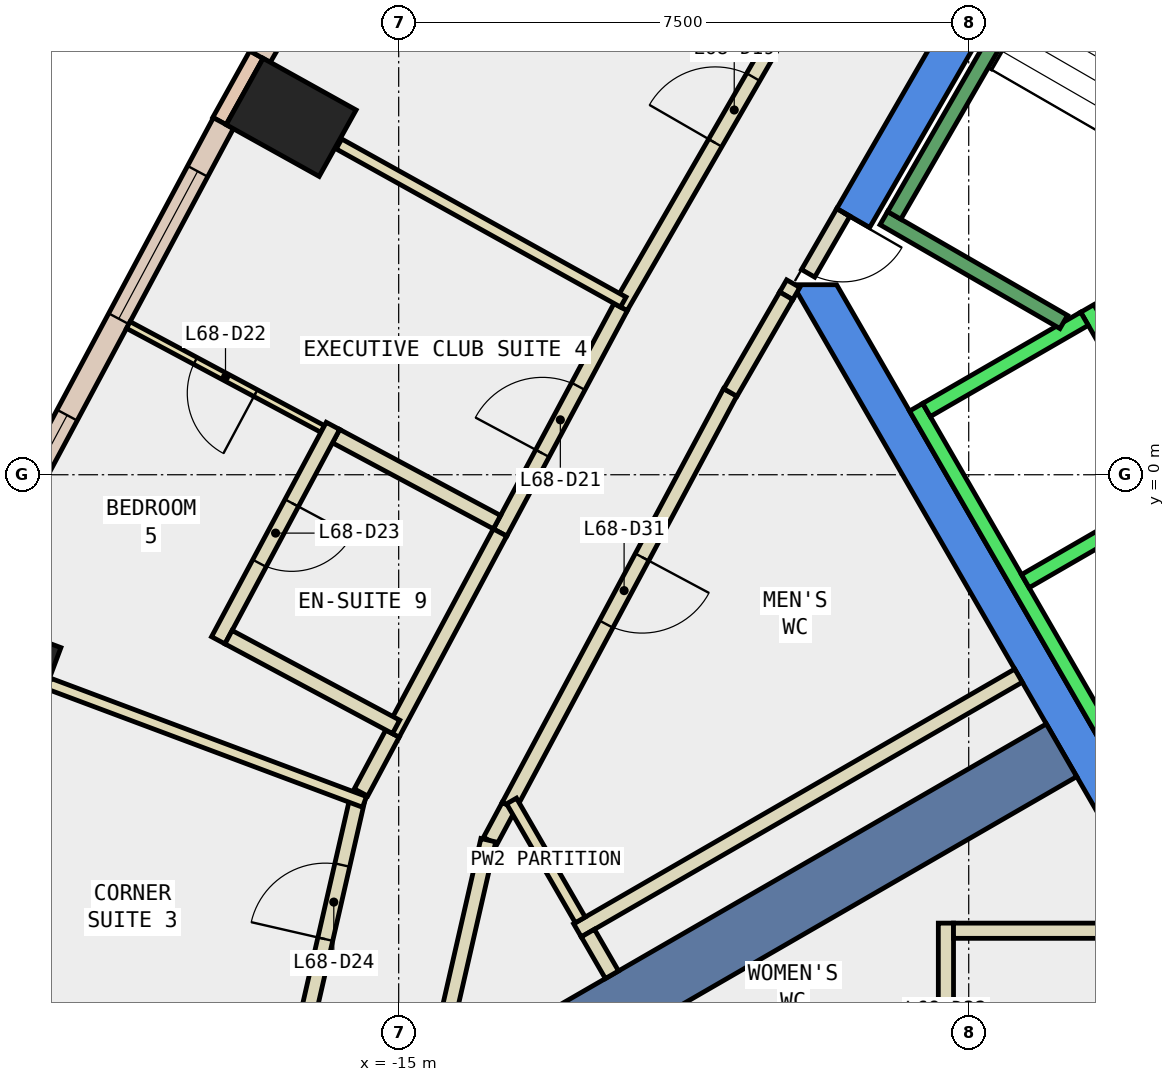
"""IFC4 building model, lengths in metres.
Left out: names, types, materials, properties, quantities, classifications, styles, units other than length and angle.
Written with IfcOpenShell. Run it as: python <this file> out.ifc"""

import sys

from ifc_helpers import new_model, si_unit, direction, frame, frame_2d, origin, origin_2d, place, context, subcontext, project, spatial, polyline, rectangle, outline, extrude, element, fill, save


model = new_model("IFC4")
c1 = context("Model", 3, precision=1e-05, world=origin(), true_north=direction((0.0, 1.0)))
c2 = subcontext(c1, "Body", "Model", "MODEL_VIEW")
j1 = project(units=[si_unit("LENGTHUNIT", "METRE"), si_unit("PLANEANGLEUNIT", "RADIAN")], contexts=[c1])
p1 = place(None, origin())
s1 = spatial("IfcSite", under=j1, at=p1, CompositionType="ELEMENT")
p2 = place(p1, origin())
s2 = spatial("IfcBuilding", under=s1, at=p2, CompositionType="ELEMENT")
p3 = place(p2, frame((0.0, 0.0, 293.6)))
s3 = spatial("IfcBuildingStorey", under=s2, at=p3, CompositionType="ELEMENT", Elevation=293.6)
for number, where, z_axis, x_axis in (
    (1, (-16.415, 4.702, -0.34), (0.0, 0.0, 1.0), (0.486, 0.874, 0.0)),
    (2, (-20.275, -2.497, -0.34), (0.0, 0.0, 1.0), (0.351, 0.936, 0.0)),
):
    element("IfcColumn", number, at=place(p3, frame(where, z_axis=z_axis, x_axis=x_axis)), inside=s3, PredefinedType="COLUMN", context=c2, shape_type="SweptSolid", body=[
        extrude(rectangle(XDim=1.0, YDim=1.4, at=origin_2d()), origin(), (0.0, 0.0, 1.0), 3.6),
    ])
p4 = place(p3, frame((0.0, 0.0, -0.34)))
e3 = element("IfcWall", 3, at=p4, inside=s3, PredefinedType="SHEAR", context=c2, shape_type="SweptSolid", body=[
    extrude(outline(polyline([(-9.236, 3.502), (-8.803, 3.253), (-4.619, 10.5), (-4.907, 11.0), (-9.236, 3.502)])), origin(), (0.0, 0.0, 1.0), 3.6),
])
p5 = place(p3, frame((0.0, 0.0, -0.34)))
e4 = element("IfcWall", 4, at=p5, inside=s3, PredefinedType="SHEAR", context=c2, shape_type="SweptSolid", body=[
    extrude(outline(polyline([(-9.815, 2.5), (-4.907, -6.0), (-4.619, -5.5), (-9.238, 2.5), (-9.815, 2.5)])), origin(), (0.0, 0.0, 1.0), 3.6),
])
p6 = place(p3, frame((-6.279, -3.625, -0.34), z_axis=(0.0, 0.0, 1.0), x_axis=(-0.866017533419, -0.500013631625, 0.0)))
e5 = element("IfcWall", 5, at=p6, inside=s3, PredefinedType="SHEAR", context=c2, shape_type="SweptSolid", body=[
    extrude(rectangle(XDim=9.0, YDim=0.8, at=frame_2d((4.5, 0.0))), origin(), (0.0, 0.0, 1.0), 3.6),
])
p7 = place(p3, frame((-16.872, 5.527, 0.0), z_axis=(0.0, 0.0, 1.0), x_axis=(-0.485850211157, -0.874042088414, 0.0)))
e6 = element("IfcWall", 6, at=p7, inside=s3, PredefinedType="STANDARD", context=c2, shape_type="SweptSolid", body=[
    extrude(rectangle(XDim=1.0, YDim=0.2, at=frame_2d((0.5, 0.0))), origin(), (0.0, 0.0, 1.0), 3.26),
])
p8 = place(p3, frame((-13.172, 11.819, 0.0), z_axis=(0.0, 0.0, 1.0), x_axis=(-0.499945412946, -0.866056917341, 0.0)))
e7 = element("IfcWall", 7, at=p8, inside=s3, PredefinedType="STANDARD", context=c2, shape_type="SweptSolid", body=[
    extrude(rectangle(XDim=7.299, YDim=0.3, at=frame_2d((3.649, 0.0))), origin(), (0.0, 0.0, 1.0), 3.26),
])
p9 = place(p8, frame((0.725, 0.0, 0.9)))
e8 = element("IfcOpeningElement", 8, at=p9, cuts=e7, PredefinedType="OPENING", context=c2, shape_type="SweptSolid", body=[
    extrude(rectangle(XDim=2.2, YDim=2.0, at=frame_2d((1.1, 1.0))), frame((0.0, 0.16, 0.0), z_axis=(0.0, -1.0, 0.0), x_axis=(1.0, 0.0, 0.0)), (0.0, 0.0, 1.0), 0.32),
])
p10 = place(p8, frame((4.374, 0.0, 0.9)))
e9 = element("IfcOpeningElement", 9, at=p10, cuts=e7, PredefinedType="OPENING", context=c2, shape_type="SweptSolid", body=[
    extrude(rectangle(XDim=2.2, YDim=2.0, at=frame_2d((1.1, 1.0))), frame((0.0, 0.16, 0.0), z_axis=(0.0, -1.0, 0.0), x_axis=(1.0, 0.0, 0.0)), (0.0, 0.0, 1.0), 0.32),
])
p11 = place(p3, frame((-17.306, 4.626, 0.0), z_axis=(0.0, 0.0, 1.0), x_axis=(-0.471789353675, -0.881711293882, 0.0)))
e10 = element("IfcWall", 10, at=p11, inside=s3, PredefinedType="STANDARD", context=c2, shape_type="SweptSolid", body=[
    extrude(rectangle(XDim=7.277, YDim=0.3, at=frame_2d((3.638, 0.0))), origin(), (0.0, 0.0, 1.0), 3.26),
])
p12 = place(p11, frame((0.719, 0.0, 0.9)))
e11 = element("IfcOpeningElement", 11, at=p12, cuts=e10, PredefinedType="OPENING", context=c2, shape_type="SweptSolid", body=[
    extrude(rectangle(XDim=2.2, YDim=2.0, at=frame_2d((1.1, 1.0))), frame((0.0, 0.16, 0.0), z_axis=(0.0, -1.0, 0.0), x_axis=(1.0, 0.0, 0.0)), (0.0, 0.0, 1.0), 0.32),
])
p13 = place(p11, frame((4.358, 0.0, 0.9)))
e12 = element("IfcOpeningElement", 12, at=p13, cuts=e10, PredefinedType="OPENING", context=c2, shape_type="SweptSolid", body=[
    extrude(rectangle(XDim=2.2, YDim=2.0, at=frame_2d((1.1, 1.0))), frame((0.0, 0.16, 0.0), z_axis=(0.0, -1.0, 0.0), x_axis=(1.0, 0.0, 0.0)), (0.0, 0.0, 1.0), 0.32),
])
p14 = place(p3, frame((-9.809, 2.514, 0.0), z_axis=(0.0, 0.0, 1.0), x_axis=(-0.497849076449, -0.867263683708, 0.0)))
e13 = element("IfcWall", 13, at=p14, inside=s3, PredefinedType="PARTITIONING", context=c2, shape_type="SweptSolid", body=[
    extrude(rectangle(XDim=0.184, YDim=0.2, at=frame_2d((0.092, 0.0))), origin(), (0.0, 0.0, 1.0), 2.4),
])
p15 = place(p3, frame((-10.639, 1.084, 0.0), z_axis=(0.0, 0.0, 1.0), x_axis=(-0.471696599276, -0.881760918975, 0.0)))
e14 = element("IfcWall", 14, at=p15, inside=s3, PredefinedType="PARTITIONING", context=c2, shape_type="SweptSolid", body=[
    extrude(rectangle(XDim=6.172, YDim=0.2, at=frame_2d((3.086, 0.0))), origin(), (0.0, 0.0, 1.0), 3.26),
])
p16 = place(p15, frame((2.458, 0.0, 0.0)))
e15 = element("IfcOpeningElement", 15, at=p16, cuts=e14, PredefinedType="OPENING", context=c2, shape_type="SweptSolid", body=[
    extrude(rectangle(XDim=1.0, YDim=2.1, at=frame_2d((0.5, 1.05))), frame((0.0, 0.11, 0.0), z_axis=(0.0, -1.0, 0.0), x_axis=(1.0, 0.0, 0.0)), (0.0, 0.0, 1.0), 0.22),
])
p17 = place(p3, frame((-13.55, -4.358, 0.0), z_axis=(0.0, 0.0, 1.0), x_axis=(-0.472169364753, -0.881507850781, 0.0)))
e16 = element("IfcWall", 16, at=p17, inside=s3, PredefinedType="PARTITIONING", context=c2, shape_type="SweptSolid", body=[
    extrude(rectangle(XDim=0.521, YDim=0.2, at=frame_2d((0.26, 0.0))), origin(), (0.0, 0.0, 1.0), 3.26),
])
p18 = place(p3, frame((-13.821, -4.808, 0.0), z_axis=(0.0, 0.0, 1.0), x_axis=(-0.223248099856, -0.97476165595, 0.0)))
e17 = element("IfcWall", 17, at=p18, inside=s3, PredefinedType="PARTITIONING", context=c2, shape_type="SweptSolid", body=[
    extrude(rectangle(XDim=2.302, YDim=0.2, at=frame_2d((1.151, 0.0))), origin(), (0.0, 0.0, 1.0), 3.26),
])
p19 = place(p3, frame((-12.082, 2.207, 0.0), z_axis=(0.0, 0.0, 1.0), x_axis=(0.500123454404, 0.865954115618, 0.0)))
e18 = element("IfcWall", 18, at=p19, inside=s3, PredefinedType="PARTITIONING", context=c2, shape_type="SweptSolid", body=[
    extrude(rectangle(XDim=5.885, YDim=0.2, at=frame_2d((2.942, 0.0))), origin(), (0.0, 0.0, 1.0), 3.26),
])
p20 = place(p19, frame((2.493, 0.0, 0.0)))
e19 = element("IfcOpeningElement", 19, at=p20, cuts=e18, PredefinedType="OPENING", context=c2, shape_type="SweptSolid", body=[
    extrude(rectangle(XDim=1.0, YDim=2.1, at=frame_2d((0.5, 1.05))), frame((0.0, 0.11, 0.0), z_axis=(0.0, -1.0, 0.0), x_axis=(1.0, 0.0, 0.0)), (0.0, 0.0, 1.0), 0.22),
])
p21 = place(p3, frame((-13.666, -0.76, 0.0), z_axis=(0.0, 0.0, 1.0), x_axis=(0.471643060173, 0.881789557543, 0.0)))
e20 = element("IfcWall", 20, at=p21, inside=s3, PredefinedType="PARTITIONING", context=c2, shape_type="SweptSolid", body=[
    extrude(rectangle(XDim=3.363, YDim=0.2, at=frame_2d((1.681, 0.0))), origin(), (0.0, 0.0, 1.0), 3.26),
])
p22 = place(p21, frame((1.181, 0.0, 0.0)))
e21 = element("IfcOpeningElement", 21, at=p22, cuts=e20, PredefinedType="OPENING", context=c2, shape_type="SweptSolid", body=[
    extrude(rectangle(XDim=1.0, YDim=2.1, at=frame_2d((0.5, 1.05))), frame((0.0, 0.11, 0.0), z_axis=(0.0, -1.0, 0.0), x_axis=(1.0, 0.0, 0.0)), (0.0, 0.0, 1.0), 0.22),
])
p23 = place(p3, frame((-15.496, -4.18, 0.0), z_axis=(0.0, 0.0, 1.0), x_axis=(0.471280380621, 0.881983448167, 0.0)))
e22 = element("IfcWall", 22, at=p23, inside=s3, PredefinedType="PARTITIONING", context=c2, shape_type="SweptSolid", body=[
    extrude(rectangle(XDim=0.879, YDim=0.2, at=frame_2d((0.439, 0.0))), origin(), (0.0, 0.0, 1.0), 3.26),
])
p24 = place(p3, frame((-15.082, -3.405, 0.0), z_axis=(0.0, 0.0, 1.0), x_axis=(0.471719946084, 0.88174842924, 0.0)))
e23 = element("IfcWall", 23, at=p24, inside=s3, PredefinedType="PARTITIONING", context=c2, shape_type="SweptSolid", body=[
    extrude(rectangle(XDim=3.0, YDim=0.2, at=frame_2d((1.5, 0.0))), origin(), (0.0, 0.0, 1.0), 3.26),
])
p25 = place(p3, frame((-16.192, -7.098, 0.0), z_axis=(0.0, 0.0, 1.0), x_axis=(0.22330023395, 0.974749714295, 0.0)))
e24 = element("IfcWall", 24, at=p25, inside=s3, PredefinedType="PARTITIONING", context=c2, shape_type="SweptSolid", body=[
    extrude(rectangle(XDim=2.928, YDim=0.2, at=frame_2d((1.464, 0.0))), origin(), (0.0, 0.0, 1.0), 3.26),
])
p26 = place(p25, frame((1.014, 0.0, 0.0)))
e25 = element("IfcOpeningElement", 25, at=p26, cuts=e24, PredefinedType="OPENING", context=c2, shape_type="SweptSolid", body=[
    extrude(rectangle(XDim=1.0, YDim=2.1, at=frame_2d((0.5, 1.05))), frame((0.0, 0.11, 0.0), z_axis=(0.0, -1.0, 0.0), x_axis=(1.0, 0.0, 0.0)), (0.0, 0.0, 1.0), 0.22),
])
p27 = place(p3, frame((-7.8, -9.775, 0.0), z_axis=(0.0, 0.0, 1.0), x_axis=(0.0, 1.0, 0.0)))
e26 = element("IfcWall", 26, at=p27, inside=s3, PredefinedType="PARTITIONING", context=c2, shape_type="SweptSolid", body=[
    extrude(rectangle(XDim=3.876, YDim=0.2, at=frame_2d((1.938, 0.0))), origin(), (0.0, 0.0, 1.0), 3.26),
])
p28 = place(p27, frame((1.438, 0.0, 0.0)))
e27 = element("IfcOpeningElement", 27, at=p28, cuts=e26, PredefinedType="OPENING", context=c2, shape_type="SweptSolid", body=[
    extrude(rectangle(XDim=1.0, YDim=2.1, at=frame_2d((0.5, 1.05))), frame((0.0, 0.11, 0.0), z_axis=(0.0, -1.0, 0.0), x_axis=(1.0, 0.0, 0.0)), (0.0, 0.0, 1.0), 0.22),
])
p29 = place(p3, frame((-7.7, -5.999, 0.0), z_axis=(0.0, 0.0, 1.0), x_axis=(1.0, 0.0, 0.0)))
e28 = element("IfcWall", 28, at=p29, inside=s3, PredefinedType="PARTITIONING", context=c2, shape_type="SweptSolid", body=[
    extrude(rectangle(XDim=2.792, YDim=0.2, at=frame_2d((1.396, 0.0))), origin(), (0.0, 0.0, 1.0), 3.26),
])
p30 = place(p3, frame((-6.845, -2.643, 0.0), z_axis=(0.0, 0.0, 1.0), x_axis=(-0.865994457699, -0.500053596362, 0.0)))
e29 = element("IfcWall", 29, at=p30, inside=s3, PredefinedType="PARTITIONING", context=c2, shape_type="SweptSolid", body=[
    extrude(rectangle(XDim=6.701, YDim=0.2, at=frame_2d((3.351, 0.0))), origin(), (0.0, 0.0, 1.0), 3.26),
])
p31 = place(p3, frame((-12.611, -5.857, 0.0), z_axis=(0.0, 0.0, 1.0), x_axis=(-0.500120037633, 0.865956088932, 0.0)))
e30 = element("IfcWall", 30, at=p31, inside=s3, PredefinedType="PARTITIONING", context=c2, shape_type="SweptSolid", body=[
    extrude(rectangle(XDim=1.807, YDim=0.15, at=frame_2d((0.904, 0.0))), origin(), (0.0, 0.0, 1.0), 3.26),
])
p32 = place(p3, frame((-12.045, 2.272, 0.0), z_axis=(0.0, 0.0, 1.0), x_axis=(-0.873982340973, 0.485957680943, 0.0)))
e31 = element("IfcWall", 31, at=p32, inside=s3, PredefinedType="PARTITIONING", context=c2, shape_type="SweptSolid", body=[
    extrude(rectangle(XDim=4.28, YDim=0.15, at=frame_2d((2.14, 0.0))), origin(), (0.0, 0.0, 1.0), 3.26),
])
p33 = place(p3, frame((-16.0, 0.602, 0.0), z_axis=(0.0, 0.0, 1.0), x_axis=(-0.881743923375, 0.47172836844, 0.0)))
e32 = element("IfcWall", 32, at=p33, inside=s3, PredefinedType="PARTITIONING", context=c2, shape_type="SweptSolid", body=[
    extrude(rectangle(XDim=2.9, YDim=0.1, at=frame_2d((1.45, 0.0))), origin(), (0.0, 0.0, 1.0), 3.26),
])
p34 = place(p33, frame((1.0, 0.0, 0.0)))
e33 = element("IfcOpeningElement", 33, at=p34, cuts=e32, PredefinedType="OPENING", context=c2, shape_type="SweptSolid", body=[
    extrude(rectangle(XDim=0.9, YDim=2.1, at=frame_2d((0.45, 1.05))), frame((0.0, 0.06, 0.0), z_axis=(0.0, -1.0, 0.0), x_axis=(1.0, 0.0, 0.0)), (0.0, 0.0, 1.0), 0.12),
])
p35 = place(p3, frame((-13.707, -0.624, 0.0), z_axis=(0.0, 0.0, 1.0), x_axis=(-0.881825950813, 0.471575012562, 0.0)))
e34 = element("IfcWall", 34, at=p35, inside=s3, PredefinedType="PARTITIONING", context=c2, shape_type="SweptSolid", body=[
    extrude(rectangle(XDim=2.401, YDim=0.2, at=frame_2d((1.2, 0.0))), origin(), (0.0, 0.0, 1.0), 3.26),
])
p36 = place(p3, frame((-15.865, 0.643, 0.0), z_axis=(0.0, 0.0, 1.0), x_axis=(-0.471677088066, -0.881771356188, 0.0)))
e35 = element("IfcWall", 35, at=p36, inside=s3, PredefinedType="PARTITIONING", context=c2, shape_type="SweptSolid", body=[
    extrude(rectangle(XDim=3.199, YDim=0.2, at=frame_2d((1.6, 0.0))), origin(), (0.0, 0.0, 1.0), 3.26),
])
p37 = place(p36, frame((1.15, 0.0, 0.0)))
e36 = element("IfcOpeningElement", 36, at=p37, cuts=e35, PredefinedType="OPENING", context=c2, shape_type="SweptSolid", body=[
    extrude(rectangle(XDim=0.9, YDim=2.1, at=frame_2d((0.45, 1.05))), frame((0.0, 0.11, 0.0), z_axis=(0.0, -1.0, 0.0), x_axis=(1.0, 0.0, 0.0)), (0.0, 0.0, 1.0), 0.22),
])
p38 = place(p3, frame((-17.239, -2.137, 0.0), z_axis=(0.0, 0.0, 1.0), x_axis=(0.881706262609, -0.471798756332, 0.0)))
e37 = element("IfcWall", 37, at=p38, inside=s3, PredefinedType="PARTITIONING", context=c2, shape_type="SweptSolid", body=[
    extrude(rectangle(XDim=2.501, YDim=0.2, at=frame_2d((1.25, 0.0))), origin(), (0.0, 0.0, 1.0), 3.26),
])
p39 = place(p3, frame((-15.45, -4.304, 0.0), z_axis=(0.0, 0.0, 1.0), x_axis=(-0.936458128132, 0.350779381172, 0.0)))
e38 = element("IfcWall", 38, at=p39, inside=s3, PredefinedType="PARTITIONING", context=c2, shape_type="SweptSolid", body=[
    extrude(rectangle(XDim=4.433, YDim=0.15, at=frame_2d((2.216, 0.0))), origin(), (0.0, 0.0, 1.0), 3.26),
])
p40 = place(p3, frame((-9.15, 3.452, 0.0), z_axis=(0.0, 0.0, 1.0), x_axis=(-0.500079945886, -0.865979242085, 0.0)))
e39 = element("IfcWall", 39, at=p40, inside=s3, PredefinedType="PARTITIONING", context=c2, shape_type="SweptSolid", body=[
    extrude(rectangle(XDim=0.926, YDim=0.2, at=frame_2d((0.463, 0.0))), origin(), (0.0, 0.0, 1.0), 2.4),
])
p41 = place(p40, frame((0.017, 0.0, 0.0)))
e40 = element("IfcOpeningElement", 40, at=p41, cuts=e39, PredefinedType="OPENING", context=c2, shape_type="SweptSolid", body=[
    extrude(rectangle(XDim=0.9, YDim=2.1, at=frame_2d((0.45, 1.05))), frame((0.0, 0.11, 0.0), z_axis=(0.0, -1.0, 0.0), x_axis=(1.0, 0.0, 0.0)), (0.0, 0.0, 1.0), 0.22),
])
p42 = place(p3, frame((-12.194, -6.578, 0.0), z_axis=(0.0, 0.0, 1.0), x_axis=(-0.500701704226, 0.865619895442, 0.0)))
e41 = element("IfcWall", 41, at=p42, inside=s3, PredefinedType="PARTITIONING", context=c2, shape_type="SweptSolid", body=[
    extrude(rectangle(XDim=0.633, YDim=0.2, at=frame_2d((0.316, 0.0))), origin(), (0.0, 0.0, 1.0), 3.26),
])
p43 = place(p3, frame((-9.901, 2.354, 0.0), z_axis=(0.0, 0.0, 1.0), x_axis=(-0.500374498448, -0.865809079014, 0.0)))
e42 = element("IfcWall", 42, at=p43, inside=s3, PredefinedType="PARTITIONING", context=c2, shape_type="SweptSolid", body=[
    extrude(rectangle(XDim=1.469, YDim=0.2, at=frame_2d((0.734, 0.0))), origin(), (0.0, 0.0, 1.0), 3.26),
])
p44 = place(p3, frame((-5.94, 2.188, 0.0), z_axis=(0.0, 0.0, 1.0), x_axis=(0.500034260056, -0.866005622828, 0.0)))
e43 = element("IfcWall", 43, at=p44, inside=s3, PredefinedType="STANDARD", context=c2, shape_type="SweptSolid", body=[
    extrude(rectangle(XDim=5.399, YDim=0.2, at=frame_2d((2.7, 0.0))), origin(), (0.0, 0.0, 1.0), 3.26),
])
p45 = place(p44, frame((3.075, 0.0, 0.0)))
e44 = element("IfcOpeningElement", 44, at=p45, cuts=e43, PredefinedType="OPENING", context=c2, shape_type="SweptSolid", body=[
    extrude(rectangle(XDim=1.1, YDim=2.1, at=frame_2d((0.55, 1.05))), frame((0.0, 0.11, 0.0), z_axis=(0.0, -1.0, 0.0), x_axis=(1.0, 0.0, 0.0)), (0.0, 0.0, 1.0), 0.22),
])
p46 = place(p44, frame((1.225, 0.0, 0.0)))
e45 = element("IfcOpeningElement", 45, at=p46, cuts=e43, PredefinedType="OPENING", context=c2, shape_type="SweptSolid", body=[
    extrude(rectangle(XDim=1.1, YDim=2.1, at=frame_2d((0.55, 1.05))), frame((0.0, 0.11, 0.0), z_axis=(0.0, -1.0, 0.0), x_axis=(1.0, 0.0, 0.0)), (0.0, 0.0, 1.0), 0.22),
])
p47 = place(p3, frame((-8.192, 0.888, 0.0), z_axis=(0.0, 0.0, 1.0), x_axis=(0.500034260056, -0.866005622828, 0.0)))
e46 = element("IfcWall", 46, at=p47, inside=s3, PredefinedType="STANDARD", context=c2, shape_type="SweptSolid", body=[
    extrude(rectangle(XDim=5.399, YDim=0.2, at=frame_2d((2.7, 0.0))), origin(), (0.0, 0.0, 1.0), 3.26),
])
for number, where, z_axis, x_axis in (
    (47, (-5.977, 2.052, 0.0), (0.0, 0.0, 1.0), (-0.866, -0.5, 0.0)),
    (48, (-4.677, -0.2, 0.0), (0.0, 0.0, 1.0), (-0.866, -0.5, 0.0)),
):
    element("IfcWall", number, at=place(p3, frame(where, z_axis=z_axis, x_axis=x_axis)), inside=s3, PredefinedType="STANDARD", context=c2, shape_type="SweptSolid", body=[
        extrude(rectangle(XDim=2.399, YDim=0.2, at=frame_2d((1.2, 0.0))), origin(), (0.0, 0.0, 1.0), 3.26),
    ])
p48 = place(p3, frame((-6.25, 2.01, 0.0), z_axis=(0.0, 0.0, 1.0), x_axis=(-0.86611865017, 0.499838457731, 0.0)))
e49 = element("IfcWall", 49, at=p48, inside=s3, PredefinedType="STANDARD", context=c2, shape_type="SweptSolid", body=[
    extrude(rectangle(XDim=2.733, YDim=0.2, at=frame_2d((1.366, 0.0))), origin(), (0.0, 0.0, 1.0), 3.26),
])
p49 = place(p3, frame((-5.03, 9.388, 0.0), z_axis=(0.0, 0.0, 1.0), x_axis=(-0.499978703459, -0.866037698999, 0.0)))
e50 = element("IfcWall", 50, at=p49, inside=s3, PredefinedType="STANDARD", context=c2, shape_type="SweptSolid", body=[
    extrude(rectangle(XDim=6.9, YDim=0.2, at=frame_2d((3.45, 0.0))), origin(), (0.0, 0.0, 1.0), 3.26),
])
p50 = place(p12, origin())
e51 = element("IfcWindow", 51, at=p50, inside=s3, PartitioningType="SINGLE_PANEL", PredefinedType="WINDOW", context=c2, shape_type="SweptSolid", body=[
    extrude(rectangle(XDim=2.2, YDim=2.0, at=frame_2d((1.1, 1.0))), frame((0.0, 0.03, 0.0), z_axis=(0.0, -1.0, 0.0), x_axis=(1.0, 0.0, 0.0)), (0.0, 0.0, 1.0), 0.06),
])
fill(e11, e51)
p51 = place(p13, origin())
e52 = element("IfcWindow", 52, at=p51, inside=s3, PartitioningType="SINGLE_PANEL", PredefinedType="WINDOW", context=c2, shape_type="SweptSolid", body=[
    extrude(rectangle(XDim=2.2, YDim=2.0, at=frame_2d((1.1, 1.0))), frame((0.0, 0.03, 0.0), z_axis=(0.0, -1.0, 0.0), x_axis=(1.0, 0.0, 0.0)), (0.0, 0.0, 1.0), 0.06),
])
fill(e12, e52)
p52 = place(p20, origin())
e53 = element("IfcDoor", 53, at=p52, inside=s3, OperationType="SINGLE_SWING_LEFT", PredefinedType="DOOR", context=c2, shape_type="SweptSolid", body=[
    extrude(rectangle(XDim=1.0, YDim=2.1, at=frame_2d((0.5, 1.05))), frame((0.0, 0.025, 0.0), z_axis=(0.0, -1.0, 0.0), x_axis=(1.0, 0.0, 0.0)), (0.0, 0.0, 1.0), 0.05),
])
fill(e19, e53)
p53 = place(p22, origin())
e54 = element("IfcDoor", 54, at=p53, inside=s3, OperationType="SINGLE_SWING_LEFT", PredefinedType="DOOR", context=c2, shape_type="SweptSolid", body=[
    extrude(rectangle(XDim=1.0, YDim=2.1, at=frame_2d((0.5, 1.05))), frame((0.0, 0.025, 0.0), z_axis=(0.0, -1.0, 0.0), x_axis=(1.0, 0.0, 0.0)), (0.0, 0.0, 1.0), 0.05),
])
fill(e21, e54)
p54 = place(p34, origin())
e55 = element("IfcDoor", 55, at=p54, inside=s3, OperationType="SINGLE_SWING_LEFT", PredefinedType="DOOR", context=c2, shape_type="SweptSolid", body=[
    extrude(rectangle(XDim=0.9, YDim=2.1, at=frame_2d((0.45, 1.05))), frame((0.0, 0.025, 0.0), z_axis=(0.0, -1.0, 0.0), x_axis=(1.0, 0.0, 0.0)), (0.0, 0.0, 1.0), 0.05),
])
fill(e33, e55)
p55 = place(p37, origin())
e56 = element("IfcDoor", 56, at=p55, inside=s3, OperationType="SINGLE_SWING_LEFT", PredefinedType="DOOR", context=c2, shape_type="SweptSolid", body=[
    extrude(rectangle(XDim=0.9, YDim=2.1, at=frame_2d((0.45, 1.05))), frame((0.0, 0.025, 0.0), z_axis=(0.0, -1.0, 0.0), x_axis=(1.0, 0.0, 0.0)), (0.0, 0.0, 1.0), 0.05),
])
fill(e36, e56)
p56 = place(p26, origin())
e57 = element("IfcDoor", 57, at=p56, inside=s3, OperationType="SINGLE_SWING_LEFT", PredefinedType="DOOR", context=c2, shape_type="SweptSolid", body=[
    extrude(rectangle(XDim=1.0, YDim=2.1, at=frame_2d((0.5, 1.05))), frame((0.0, 0.025, 0.0), z_axis=(0.0, -1.0, 0.0), x_axis=(1.0, 0.0, 0.0)), (0.0, 0.0, 1.0), 0.05),
])
fill(e25, e57)
p57 = place(p16, origin())
e58 = element("IfcDoor", 58, at=p57, inside=s3, OperationType="SINGLE_SWING_LEFT", PredefinedType="DOOR", context=c2, shape_type="SweptSolid", body=[
    extrude(rectangle(XDim=1.0, YDim=2.1, at=frame_2d((0.5, 1.05))), frame((0.0, 0.025, 0.0), z_axis=(0.0, -1.0, 0.0), x_axis=(1.0, 0.0, 0.0)), (0.0, 0.0, 1.0), 0.05),
])
fill(e15, e58)
p58 = place(p41, origin())
e59 = element("IfcDoor", 59, at=p58, inside=s3, OperationType="SINGLE_SWING_LEFT", PredefinedType="DOOR", context=c2, shape_type="SweptSolid", body=[
    extrude(rectangle(XDim=0.9, YDim=2.1, at=frame_2d((0.45, 1.05))), frame((0.0, 0.025, 0.0), z_axis=(0.0, -1.0, 0.0), x_axis=(1.0, 0.0, 0.0)), (0.0, 0.0, 1.0), 0.05),
])
fill(e40, e59)
save(model, sys.argv[1])
